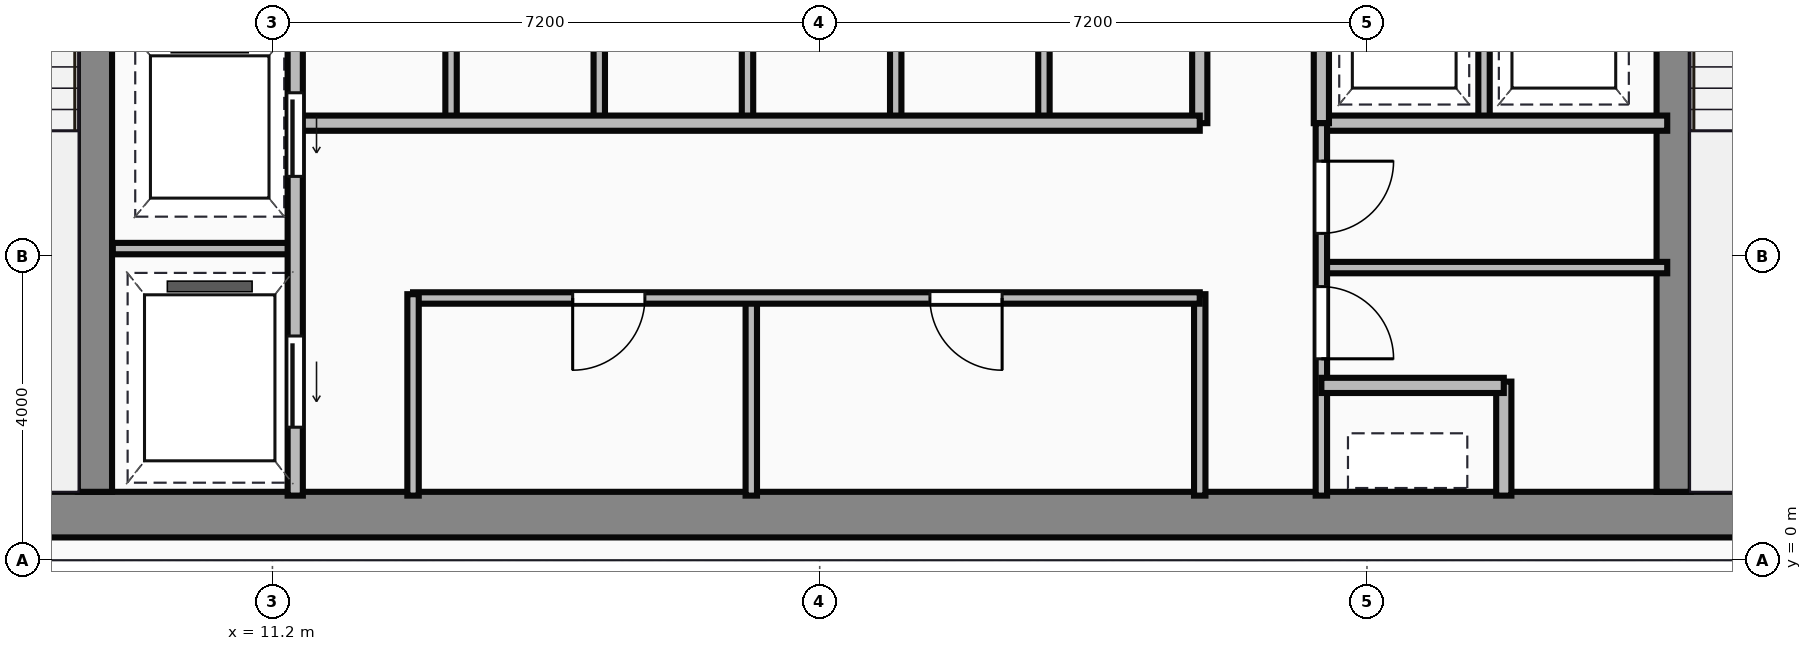
"""IFC4 building model, lengths in metres.
Left out: names, types, materials, properties, quantities, classifications, styles, units other than length and angle.
Written with IfcOpenShell. Run it as: python <this file> out.ifc"""

import sys

from ifc_helpers import new_model, si_unit, direction, frame, frame_2d, origin, place, context, subcontext, project, spatial, rectangle, extrude, source, transform, mapped, element, fill, save


model = new_model("IFC4")
c1 = context("Model", 3, precision=1e-05, world=origin(), true_north=direction((0.0, 1.0)))
c2 = subcontext(c1, "Body", "Model", "MODEL_VIEW")
j1 = project(units=[si_unit("LENGTHUNIT", "METRE"), si_unit("PLANEANGLEUNIT", "RADIAN")], contexts=[c1])
p1 = place(None, origin())
s1 = spatial("IfcSite", under=j1, at=p1, CompositionType="ELEMENT")
p2 = place(p1, origin())
s2 = spatial("IfcBuilding", under=s1, at=p2, CompositionType="ELEMENT")
p3 = place(p2, frame((0.0, 0.0, 188.6)))
s3 = spatial("IfcBuildingStorey", under=s2, at=p3, CompositionType="ELEMENT", Elevation=188.6)
m1 = source(origin(), c2, "Body", "SweptSolid", [
    extrude(rectangle(XDim=29.5, YDim=0.6, at=frame_2d((14.75, 0.0))), origin(), (0.0, 0.0, 1.0), 3.65),
])
p4 = place(p3, frame((4.5, 0.6, 0.0), z_axis=(0.0, 0.0, 1.0), x_axis=(1.0, 0.0, 0.0)))
e1 = element("IfcWall", 1, at=p4, inside=s3, PredefinedType="SHEAR", context=c2, shape_type="MappedRepresentation", body=[
    mapped(m1, transform((0.0, 0.0, 0.0))),
])
m2 = source(origin(), c2, "Body", "SweptSolid", [
    extrude(rectangle(XDim=12.5, YDim=0.45, at=frame_2d((6.25, 0.0))), origin(), (0.0, 0.0, 1.0), 3.65),
])
for number, where, z_axis, x_axis in (
    (2, (8.865, 0.9, 0.0), (0.0, 0.0, 1.0), (0.0, 1.0, 0.0)),
    (3, (29.635, 0.9, 0.0), (0.0, 0.0, 1.0), (0.0, 1.0, 0.0)),
):
    element("IfcWall", number, at=place(p3, frame(where, z_axis=z_axis, x_axis=x_axis)), inside=s3, PredefinedType="SHEAR", context=c2, shape_type="MappedRepresentation", body=[
        mapped(m2, transform((0.0, 0.0, 0.0))),
    ])
m3 = source(origin(), c2, "Body", "SweptSolid", [
    extrude(rectangle(XDim=9.6, YDim=0.2, at=frame_2d((4.8, 0.0))), origin(), (0.0, 0.0, 1.0), 3.4),
])
p5 = place(p3, frame((11.5, 0.85, 0.0), z_axis=(0.0, 0.0, 1.0), x_axis=(0.0, 1.0, 0.0)))
e4 = element("IfcWall", 4, at=p5, inside=s3, PredefinedType="PARTITIONING", context=c2, shape_type="MappedRepresentation", body=[
    mapped(m3, transform((0.0, 0.0, 0.0))),
])
p6 = place(p5, frame((4.2, 0.0, 0.0)))
e5 = element("IfcOpeningElement", 5, at=p6, cuts=e4, PredefinedType="OPENING", context=c2, shape_type="SweptSolid", body=[
    extrude(rectangle(XDim=1.1, YDim=2.15, at=frame_2d((0.55, 1.075))), frame((0.0, 0.11, 0.0), z_axis=(0.0, -1.0, 0.0), x_axis=(1.0, 0.0, 0.0)), (0.0, 0.0, 1.0), 0.22),
])
p7 = place(p5, frame((0.9, 0.0, 0.0)))
e6 = element("IfcOpeningElement", 6, at=p7, cuts=e4, PredefinedType="OPENING", context=c2, shape_type="SweptSolid", body=[
    extrude(rectangle(XDim=1.2, YDim=2.15, at=frame_2d((0.6, 1.075))), frame((0.0, 0.11, 0.0), z_axis=(0.0, -1.0, 0.0), x_axis=(1.0, 0.0, 0.0)), (0.0, 0.0, 1.0), 0.22),
])
m4 = source(origin(), c2, "Body", "SweptSolid", [
    extrude(rectangle(XDim=2.4, YDim=0.15, at=frame_2d((1.2, 0.0))), origin(), (0.0, 0.0, 1.0), 3.4),
])
p8 = place(p3, frame((9.1, 4.1, 0.0), z_axis=(0.0, 0.0, 1.0), x_axis=(1.0, 0.0, 0.0)))
e7 = element("IfcWall", 7, at=p8, inside=s3, PredefinedType="PARTITIONING", context=c2, shape_type="MappedRepresentation", body=[
    mapped(m4, transform((0.0, 0.0, 0.0))),
])
m5 = source(origin(), c2, "Body", "SweptSolid", [
    extrude(rectangle(XDim=2.65, YDim=0.15, at=frame_2d((1.325, 0.0))), origin(), (0.0, 0.0, 1.0), 3.4),
])
p9 = place(p3, frame((13.05, 0.85, 0.0), z_axis=(0.0, 0.0, 1.0), x_axis=(0.0, 1.0, 0.0)))
e8 = element("IfcWall", 8, at=p9, inside=s3, PredefinedType="PARTITIONING", context=c2, shape_type="MappedRepresentation", body=[
    mapped(m5, transform((0.0, 0.0, 0.0))),
])
m6 = source(origin(), c2, "Body", "SweptSolid", [
    extrude(rectangle(XDim=10.35, YDim=0.15, at=frame_2d((5.175, 0.0))), origin(), (0.0, 0.0, 1.0), 3.4),
])
p10 = place(p3, frame((13.05, 3.45, 0.0), z_axis=(0.0, 0.0, 1.0), x_axis=(1.0, 0.0, 0.0)))
e9 = element("IfcWall", 9, at=p10, inside=s3, PredefinedType="PARTITIONING", context=c2, shape_type="MappedRepresentation", body=[
    mapped(m6, transform((0.0, 0.0, 0.0))),
])
p11 = place(p10, frame((2.1, 0.0, 0.0)))
e10 = element("IfcOpeningElement", 10, at=p11, cuts=e9, PredefinedType="OPENING", context=c2, shape_type="SweptSolid", body=[
    extrude(rectangle(XDim=0.95, YDim=2.15, at=frame_2d((0.475, 1.075))), frame((0.0, 0.085, 0.0), z_axis=(0.0, -1.0, 0.0), x_axis=(1.0, 0.0, 0.0)), (0.0, 0.0, 1.0), 0.17),
])
p12 = place(p10, frame((6.8, 0.0, 0.0)))
e11 = element("IfcOpeningElement", 11, at=p12, cuts=e9, PredefinedType="OPENING", context=c2, shape_type="SweptSolid", body=[
    extrude(rectangle(XDim=0.95, YDim=2.15, at=frame_2d((0.475, 1.075))), frame((0.0, 0.085, 0.0), z_axis=(0.0, -1.0, 0.0), x_axis=(1.0, 0.0, 0.0)), (0.0, 0.0, 1.0), 0.17),
])
p13 = place(p3, frame((23.4, 0.85, 0.0), z_axis=(0.0, 0.0, 1.0), x_axis=(0.0, 1.0, 0.0)))
e12 = element("IfcWall", 12, at=p13, inside=s3, PredefinedType="PARTITIONING", context=c2, shape_type="MappedRepresentation", body=[
    mapped(m5, transform((0.0, 0.0, 0.0))),
])
m7 = source(origin(), c2, "Body", "SweptSolid", [
    extrude(rectangle(XDim=2.6, YDim=0.15, at=frame_2d((1.3, 0.0))), origin(), (0.0, 0.0, 1.0), 3.4),
])
p14 = place(p3, frame((17.5, 0.85, 0.0), z_axis=(0.0, 0.0, 1.0), x_axis=(0.0, 1.0, 0.0)))
e13 = element("IfcWall", 13, at=p14, inside=s3, PredefinedType="PARTITIONING", context=c2, shape_type="MappedRepresentation", body=[
    mapped(m7, transform((0.0, 0.0, 0.0))),
])
m8 = source(origin(), c2, "Body", "SweptSolid", [
    extrude(rectangle(XDim=11.85, YDim=0.2, at=frame_2d((5.925, 0.0))), origin(), (0.0, 0.0, 1.0), 3.4),
])
p15 = place(p3, frame((11.55, 5.75, 0.0), z_axis=(0.0, 0.0, 1.0), x_axis=(1.0, 0.0, 0.0)))
e14 = element("IfcWall", 14, at=p15, inside=s3, PredefinedType="PARTITIONING", context=c2, shape_type="MappedRepresentation", body=[
    mapped(m8, transform((0.0, 0.0, 0.0))),
])
m9 = source(origin(), c2, "Body", "SweptSolid", [
    extrude(rectangle(XDim=2.6, YDim=0.2, at=frame_2d((1.3, 0.0))), origin(), (0.0, 0.0, 1.0), 3.4),
])
p16 = place(p3, frame((23.4, 5.75, 0.0), z_axis=(0.0, 0.0, 1.0), x_axis=(0.0, 1.0, 0.0)))
e15 = element("IfcWall", 15, at=p16, inside=s3, PredefinedType="PARTITIONING", context=c2, shape_type="MappedRepresentation", body=[
    mapped(m9, transform((0.0, 0.0, 0.0))),
])
m10 = source(origin(), c2, "Body", "SweptSolid", [
    extrude(rectangle(XDim=2.5, YDim=0.15, at=frame_2d((1.25, 0.0))), origin(), (0.0, 0.0, 1.0), 3.4),
])
for number, where, z_axis, x_axis in (
    (16, (13.55, 5.8, 0.0), (0.0, 0.0, 1.0), (0.0, 1.0, 0.0)),
    (17, (15.5, 5.8, 0.0), (0.0, 0.0, 1.0), (0.0, 1.0, 0.0)),
    (18, (17.45, 5.8, 0.0), (0.0, 0.0, 1.0), (0.0, 1.0, 0.0)),
    (19, (19.4, 5.8, 0.0), (0.0, 0.0, 1.0), (0.0, 1.0, 0.0)),
    (20, (21.35, 5.8, 0.0), (0.0, 0.0, 1.0), (0.0, 1.0, 0.0)),
):
    element("IfcWall", number, at=place(p3, frame(where, z_axis=z_axis, x_axis=x_axis)), inside=s3, PredefinedType="PARTITIONING", context=c2, shape_type="MappedRepresentation", body=[
        mapped(m10, transform((0.0, 0.0, 0.0))),
    ])
m11 = source(origin(), c2, "Body", "SweptSolid", [
    extrude(rectangle(XDim=4.55, YDim=0.2, at=frame_2d((2.275, 0.0))), origin(), (0.0, 0.0, 1.0), 3.4),
])
p17 = place(p3, frame((25.0, 5.75, 0.0), z_axis=(0.0, 0.0, 1.0), x_axis=(1.0, 0.0, 0.0)))
e21 = element("IfcWall", 21, at=p17, inside=s3, PredefinedType="PARTITIONING", context=c2, shape_type="MappedRepresentation", body=[
    mapped(m11, transform((0.0, 0.0, 0.0))),
])
p18 = place(p3, frame((25.0, 5.75, 0.0), z_axis=(0.0, 0.0, 1.0), x_axis=(0.0, 1.0, 0.0)))
e22 = element("IfcWall", 22, at=p18, inside=s3, PredefinedType="PARTITIONING", context=c2, shape_type="MappedRepresentation", body=[
    mapped(m9, transform((0.0, 0.0, 0.0))),
])
p19 = place(p3, frame((27.14, 5.8, 0.0), z_axis=(0.0, 0.0, 1.0), x_axis=(0.0, 1.0, 0.0)))
e23 = element("IfcWall", 23, at=p19, inside=s3, PredefinedType="PARTITIONING", context=c2, shape_type="MappedRepresentation", body=[
    mapped(m10, transform((0.0, 0.0, 0.0))),
])
m12 = source(origin(), c2, "Body", "SweptSolid", [
    extrude(rectangle(XDim=4.9, YDim=0.15, at=frame_2d((2.45, 0.0))), origin(), (0.0, 0.0, 1.0), 3.4),
])
p20 = place(p3, frame((25.0, 0.85, 0.0), z_axis=(0.0, 0.0, 1.0), x_axis=(0.0, 1.0, 0.0)))
e24 = element("IfcWall", 24, at=p20, inside=s3, PredefinedType="PARTITIONING", context=c2, shape_type="MappedRepresentation", body=[
    mapped(m12, transform((0.0, 0.0, 0.0))),
])
p21 = place(p20, frame((1.8, 0.0, 0.0)))
e25 = element("IfcOpeningElement", 25, at=p21, cuts=e24, PredefinedType="OPENING", context=c2, shape_type="SweptSolid", body=[
    extrude(rectangle(XDim=0.95, YDim=2.15, at=frame_2d((0.475, 1.075))), frame((0.0, 0.085, 0.0), z_axis=(0.0, -1.0, 0.0), x_axis=(1.0, 0.0, 0.0)), (0.0, 0.0, 1.0), 0.17),
])
p22 = place(p20, frame((3.45, 0.0, 0.0)))
e26 = element("IfcOpeningElement", 26, at=p22, cuts=e24, PredefinedType="OPENING", context=c2, shape_type="SweptSolid", body=[
    extrude(rectangle(XDim=0.95, YDim=2.15, at=frame_2d((0.475, 1.075))), frame((0.0, 0.085, 0.0), z_axis=(0.0, -1.0, 0.0), x_axis=(1.0, 0.0, 0.0)), (0.0, 0.0, 1.0), 0.17),
])
m13 = source(origin(), c2, "Body", "SweptSolid", [
    extrude(rectangle(XDim=2.4, YDim=0.2, at=frame_2d((1.2, 0.0))), origin(), (0.0, 0.0, 1.0), 3.4),
])
p23 = place(p3, frame((25.0, 2.3, 0.0), z_axis=(0.0, 0.0, 1.0), x_axis=(1.0, 0.0, 0.0)))
e27 = element("IfcWall", 27, at=p23, inside=s3, PredefinedType="PARTITIONING", context=c2, shape_type="MappedRepresentation", body=[
    mapped(m13, transform((0.0, 0.0, 0.0))),
])
m14 = source(origin(), c2, "Body", "SweptSolid", [
    extrude(rectangle(XDim=1.5, YDim=0.2, at=frame_2d((0.75, 0.0))), origin(), (0.0, 0.0, 1.0), 3.4),
])
p24 = place(p3, frame((27.4, 0.85, 0.0), z_axis=(0.0, 0.0, 1.0), x_axis=(0.0, 1.0, 0.0)))
e28 = element("IfcWall", 28, at=p24, inside=s3, PredefinedType="PARTITIONING", context=c2, shape_type="MappedRepresentation", body=[
    mapped(m14, transform((0.0, 0.0, 0.0))),
])
m15 = source(origin(), c2, "Body", "SweptSolid", [
    extrude(rectangle(XDim=4.55, YDim=0.15, at=frame_2d((2.275, 0.0))), origin(), (0.0, 0.0, 1.0), 3.4),
])
p25 = place(p3, frame((25.0, 3.85, 0.0), z_axis=(0.0, 0.0, 1.0), x_axis=(1.0, 0.0, 0.0)))
e29 = element("IfcWall", 29, at=p25, inside=s3, PredefinedType="PARTITIONING", context=c2, shape_type="MappedRepresentation", body=[
    mapped(m15, transform((0.0, 0.0, 0.0))),
])
m16 = source(origin(), c2, "Body", "SweptSolid", [
    extrude(rectangle(XDim=1.1, YDim=2.15, at=frame_2d((0.55, 1.075))), frame((0.0, 0.025, 0.0), z_axis=(0.0, -1.0, 0.0), x_axis=(1.0, 0.0, 0.0)), (0.0, 0.0, 1.0), 0.05),
])
p26 = place(p6, frame((1.1, 0.0, 0.0), z_axis=(0.0, 0.0, 1.0), x_axis=(-1.0, 0.0, 0.0)))
e30 = element("IfcDoor", 30, at=p26, inside=s3, OperationType="SLIDING_TO_LEFT", PredefinedType="DOOR", context=c2, shape_type="MappedRepresentation", body=[
    mapped(m16, transform((0.0, 0.0, 0.0))),
])
fill(e5, e30)
m17 = source(origin(), c2, "Body", "SweptSolid", [
    extrude(rectangle(XDim=1.2, YDim=2.15, at=frame_2d((0.6, 1.075))), frame((0.0, 0.025, 0.0), z_axis=(0.0, -1.0, 0.0), x_axis=(1.0, 0.0, 0.0)), (0.0, 0.0, 1.0), 0.05),
])
p27 = place(p7, frame((1.2, 0.0, 0.0), z_axis=(0.0, 0.0, 1.0), x_axis=(-1.0, 0.0, 0.0)))
e31 = element("IfcDoor", 31, at=p27, inside=s3, OperationType="SLIDING_TO_LEFT", PredefinedType="DOOR", context=c2, shape_type="MappedRepresentation", body=[
    mapped(m17, transform((0.0, 0.0, 0.0))),
])
fill(e6, e31)
m18 = source(origin(), c2, "Body", "SweptSolid", [
    extrude(rectangle(XDim=0.95, YDim=2.15, at=frame_2d((0.475, 1.075))), frame((0.0, 0.025, 0.0), z_axis=(0.0, -1.0, 0.0), x_axis=(1.0, 0.0, 0.0)), (0.0, 0.0, 1.0), 0.05),
])
p28 = place(p11, origin())
e32 = element("IfcDoor", 32, at=p28, inside=s3, OperationType="SINGLE_SWING_LEFT", PredefinedType="DOOR", context=c2, shape_type="MappedRepresentation", body=[
    mapped(m18, transform((0.0, 0.0, 0.0))),
])
fill(e10, e32)
p29 = place(p12, origin())
e33 = element("IfcDoor", 33, at=p29, inside=s3, OperationType="SINGLE_SWING_RIGHT", PredefinedType="DOOR", context=c2, shape_type="MappedRepresentation", body=[
    mapped(m18, transform((0.0, 0.0, 0.0))),
])
fill(e11, e33)
p30 = place(p21, origin())
e34 = element("IfcDoor", 34, at=p30, inside=s3, OperationType="SINGLE_SWING_LEFT", PredefinedType="DOOR", context=c2, shape_type="MappedRepresentation", body=[
    mapped(m18, transform((0.0, 0.0, 0.0))),
])
fill(e25, e34)
p31 = place(p22, origin())
e35 = element("IfcDoor", 35, at=p31, inside=s3, OperationType="SINGLE_SWING_RIGHT", PredefinedType="DOOR", context=c2, shape_type="MappedRepresentation", body=[
    mapped(m18, transform((0.0, 0.0, 0.0))),
])
fill(e26, e35)
save(model, sys.argv[1])
